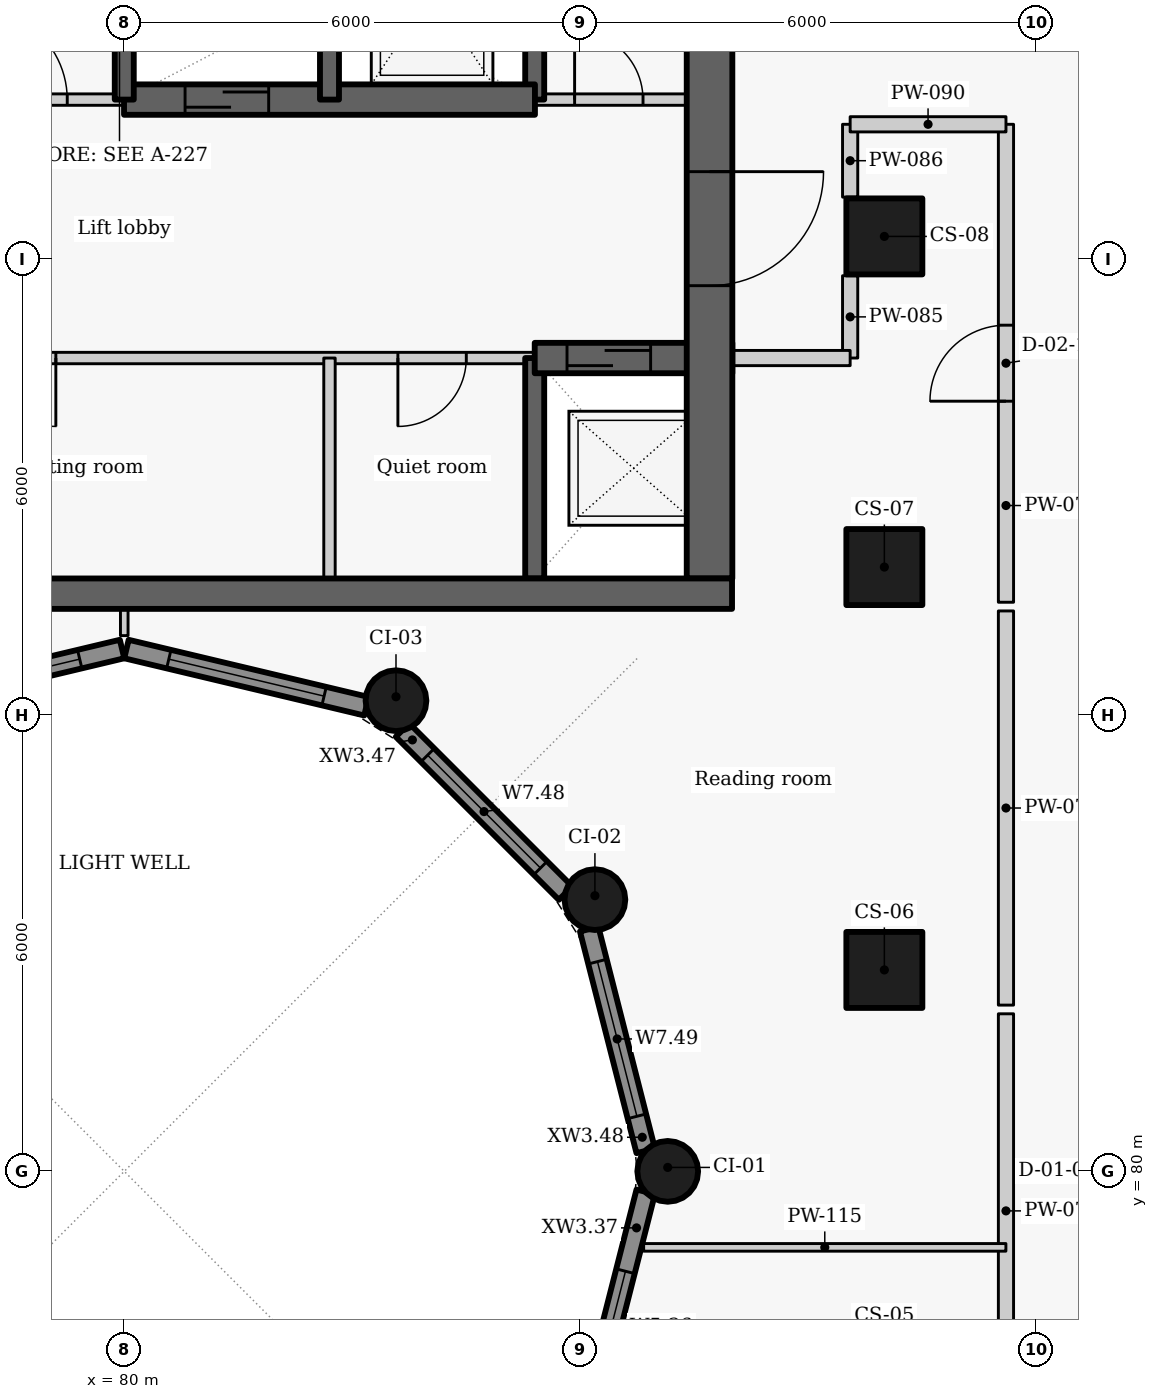
"""IFC4 building model, lengths in metres.
Left out: names, types, materials, properties, quantities, classifications, styles, units other than length and angle.
Written with IfcOpenShell. Run it as: python <this file> out.ifc"""

import sys

from ifc_helpers import new_model, si_unit, direction, frame, frame_2d, origin, origin_2d, place, context, subcontext, project, spatial, rectangle, circle, extrude, element, fill, save


model = new_model("IFC4")
c1 = context("Model", 3, precision=1e-05, world=origin(), true_north=direction((0.0, 1.0)))
c2 = subcontext(c1, "Body", "Model", "MODEL_VIEW")
j1 = project(units=[si_unit("LENGTHUNIT", "METRE"), si_unit("PLANEANGLEUNIT", "RADIAN")], contexts=[c1])
p1 = place(None, origin())
s1 = spatial("IfcSite", under=j1, at=p1, CompositionType="ELEMENT")
p2 = place(p1, origin())
s2 = spatial("IfcBuilding", under=s1, at=p2, CompositionType="ELEMENT")
p3 = place(p2, frame((0.0, 0.0, 150.3)))
s3 = spatial("IfcBuildingStorey", under=s2, at=p3, CompositionType="ELEMENT", Elevation=150.3)
for number, where, z_axis, x_axis in (
    (1, (90.0, 82.65, 0.0), (0.0, 0.0, 1.0), (0.0, 1.0, 0.0)),
    (2, (90.0, 87.95, 0.0), (0.0, 0.0, 1.0), (0.0, 1.0, 0.0)),
    (3, (90.0, 92.3, 0.0), (0.0, 0.0, 1.0), (0.0, 1.0, 0.0)),
):
    element("IfcColumn", number, at=place(p3, frame(where, z_axis=z_axis, x_axis=x_axis)), inside=s3, PredefinedType="COLUMN", context=c2, shape_type="SweptSolid", body=[
        extrude(rectangle(XDim=1.0, YDim=1.0, at=origin_2d()), origin(), (0.0, 0.0, 1.0), 3.3),
    ])
for number, where, z_axis, x_axis in (
    (4, (87.15, 80.0, 0.0), (0.0, 0.0, 1.0), (0.0, 1.0, 0.0)),
    (5, (86.192, 83.575, 0.0), (0.0, 0.0, 1.0), (-0.5, 0.866, 0.0)),
    (6, (83.575, 86.192, 0.0), (0.0, 0.0, 1.0), (-0.866, 0.5, 0.0)),
):
    element("IfcColumn", number, at=place(p3, frame(where, z_axis=z_axis, x_axis=x_axis)), inside=s3, PredefinedType="COLUMN", context=c2, shape_type="SweptSolid", body=[
        extrude(circle(Radius=0.4, at=origin_2d()), origin(), (0.0, 0.0, 1.0), 3.3),
    ])
p4 = place(p3, frame((86.86, 79.73, 0.0), z_axis=(0.0, 0.0, 1.0), x_axis=(-0.247055971283, -0.969001211069, 0.0)))
e7 = element("IfcWall", 7, at=p4, inside=s3, PredefinedType="SOLIDWALL", context=c2, shape_type="SweptSolid", body=[
    extrude(rectangle(XDim=3.01, YDim=0.25, at=frame_2d((1.505, 0.0))), origin(), (0.0, 0.0, 1.0), 2.425),
])
p5 = place(p4, frame((1.077, 0.0, 0.9)))
e8 = element("IfcOpeningElement", 8, at=p5, cuts=e7, PredefinedType="OPENING", context=c2, shape_type="SweptSolid", body=[
    extrude(rectangle(XDim=1.5, YDim=1.1, at=frame_2d((0.75, 0.55))), frame((0.0, 0.135, 0.0), z_axis=(0.0, -1.0, 0.0), x_axis=(1.0, 0.0, 0.0)), (0.0, 0.0, 1.0), 0.27),
])
p6 = place(p3, frame((76.814, 86.119, 0.0), z_axis=(0.0, 0.0, 1.0), x_axis=(0.972773113459, 0.231759508395, 0.0)))
e9 = element("IfcWall", 9, at=p6, inside=s3, PredefinedType="SOLIDWALL", context=c2, shape_type="SweptSolid", body=[
    extrude(rectangle(XDim=3.246, YDim=0.25, at=frame_2d((1.623, 0.0))), origin(), (0.0, 0.0, 1.0), 2.425),
])
p7 = place(p6, frame((0.573, 0.0, 0.9)))
e10 = element("IfcOpeningElement", 10, at=p7, cuts=e9, PredefinedType="OPENING", context=c2, shape_type="SweptSolid", body=[
    extrude(rectangle(XDim=2.1, YDim=1.1, at=frame_2d((1.05, 0.55))), frame((0.0, 0.135, 0.0), z_axis=(0.0, -1.0, 0.0), x_axis=(1.0, 0.0, 0.0)), (0.0, 0.0, 1.0), 0.27),
])
p8 = place(p3, frame((80.029, 86.872, 0.0), z_axis=(0.0, 0.0, 1.0), x_axis=(0.972773113459, -0.231759508395, 0.0)))
e11 = element("IfcWall", 11, at=p8, inside=s3, PredefinedType="SOLIDWALL", context=c2, shape_type="SweptSolid", body=[
    extrude(rectangle(XDim=3.246, YDim=0.25, at=frame_2d((1.623, 0.0))), origin(), (0.0, 0.0, 1.0), 2.425),
])
p9 = place(p8, frame((0.573, 0.0, 0.9)))
e12 = element("IfcOpeningElement", 12, at=p9, cuts=e11, PredefinedType="OPENING", context=c2, shape_type="SweptSolid", body=[
    extrude(rectangle(XDim=2.1, YDim=1.1, at=frame_2d((1.05, 0.55))), frame((0.0, 0.135, 0.0), z_axis=(0.0, -1.0, 0.0), x_axis=(1.0, 0.0, 0.0)), (0.0, 0.0, 1.0), 0.27),
])
p10 = place(p3, frame((83.661, 85.806, 0.0), z_axis=(0.0, 0.0, 1.0), x_axis=(0.707106781187, -0.707106781187, 0.0)))
e13 = element("IfcWall", 13, at=p10, inside=s3, PredefinedType="SOLIDWALL", context=c2, shape_type="SweptSolid", body=[
    extrude(rectangle(XDim=3.033, YDim=0.25, at=frame_2d((1.517, 0.0))), origin(), (0.0, 0.0, 1.0), 2.425),
])
p11 = place(p10, frame((0.467, 0.0, 0.9)))
e14 = element("IfcOpeningElement", 14, at=p11, cuts=e13, PredefinedType="OPENING", context=c2, shape_type="SweptSolid", body=[
    extrude(rectangle(XDim=2.1, YDim=1.1, at=frame_2d((1.05, 0.55))), frame((0.0, 0.135, 0.0), z_axis=(0.0, -1.0, 0.0), x_axis=(1.0, 0.0, 0.0)), (0.0, 0.0, 1.0), 0.27),
])
p12 = place(p3, frame((86.117, 83.187, 0.0), z_axis=(0.0, 0.0, 1.0), x_axis=(0.247055971283, -0.969001211069, 0.0)))
e15 = element("IfcWall", 15, at=p12, inside=s3, PredefinedType="SOLIDWALL", context=c2, shape_type="SweptSolid", body=[
    extrude(rectangle(XDim=3.01, YDim=0.25, at=frame_2d((1.505, 0.0))), origin(), (0.0, 0.0, 1.0), 2.425),
])
p13 = place(p12, frame((0.441, 0.0, 0.9)))
e16 = element("IfcOpeningElement", 16, at=p13, cuts=e15, PredefinedType="OPENING", context=c2, shape_type="SweptSolid", body=[
    extrude(rectangle(XDim=2.1, YDim=1.1, at=frame_2d((1.05, 0.55))), frame((0.0, 0.135, 0.0), z_axis=(0.0, -1.0, 0.0), x_axis=(1.0, 0.0, 0.0)), (0.0, 0.0, 1.0), 0.27),
])
p14 = place(p3, frame((85.4, 90.7, 0.0), z_axis=(0.0, 0.0, 1.0), x_axis=(-1.0, 0.0, 0.0)))
e17 = element("IfcWall", 17, at=p14, inside=s3, PredefinedType="PARTITIONING", context=c2, shape_type="SweptSolid", body=[
    extrude(rectangle(XDim=13.4, YDim=0.15, at=frame_2d((6.7, 0.0))), origin(), (0.0, 0.0, 1.0), 3.025),
])
p15 = place(p14, frame((11.325, 0.0, 0.0)))
e18 = element("IfcOpeningElement", 18, at=p15, cuts=e17, PredefinedType="OPENING", context=c2, shape_type="SweptSolid", body=[
    extrude(rectangle(XDim=0.9, YDim=2.1, at=frame_2d((0.45, 1.05))), frame((0.0, 0.085, 0.0), z_axis=(0.0, -1.0, 0.0), x_axis=(1.0, 0.0, 0.0)), (0.0, 0.0, 1.0), 0.17),
])
p16 = place(p14, frame((6.3, 0.0, 0.0)))
e19 = element("IfcOpeningElement", 19, at=p16, cuts=e17, PredefinedType="OPENING", context=c2, shape_type="SweptSolid", body=[
    extrude(rectangle(XDim=0.9, YDim=2.1, at=frame_2d((0.45, 1.05))), frame((0.0, 0.085, 0.0), z_axis=(0.0, -1.0, 0.0), x_axis=(1.0, 0.0, 0.0)), (0.0, 0.0, 1.0), 0.17),
])
p17 = place(p14, frame((0.9, 0.0, 0.0)))
e20 = element("IfcOpeningElement", 20, at=p17, cuts=e17, PredefinedType="OPENING", context=c2, shape_type="SweptSolid", body=[
    extrude(rectangle(XDim=0.9, YDim=2.1, at=frame_2d((0.45, 1.05))), frame((0.0, 0.085, 0.0), z_axis=(0.0, -1.0, 0.0), x_axis=(1.0, 0.0, 0.0)), (0.0, 0.0, 1.0), 0.17),
])
p18 = place(p3, frame((85.4, 87.8, -0.275), z_axis=(0.0, 0.0, 1.0), x_axis=(0.0, 1.0, 0.0)))
e21 = element("IfcWall", 21, at=p18, inside=s3, PredefinedType="SHEAR", context=c2, shape_type="SweptSolid", body=[
    extrude(rectangle(XDim=2.9, YDim=0.25, at=frame_2d((1.45, 0.0))), origin(), (0.0, 0.0, 1.0), 3.3),
])
p19 = place(p3, frame((85.4, 94.1, -0.275), z_axis=(0.0, 0.0, 1.0), x_axis=(0.0, 1.0, 0.0)))
e22 = element("IfcWall", 22, at=p19, inside=s3, PredefinedType="SHEAR", context=c2, shape_type="SweptSolid", body=[
    extrude(rectangle(XDim=2.8, YDim=0.25, at=frame_2d((1.4, 0.0))), origin(), (0.0, 0.0, 1.0), 3.3),
])
p20 = place(p3, frame((85.4, 90.7, -0.275), z_axis=(0.0, 0.0, 1.0), x_axis=(1.0, 0.0, 0.0)))
e23 = element("IfcWall", 23, at=p20, inside=s3, PredefinedType="SHEAR", context=c2, shape_type="SweptSolid", body=[
    extrude(rectangle(XDim=2.6, YDim=0.4, at=frame_2d((1.3, 0.0))), origin(), (0.0, 0.0, 1.0), 3.3),
])
p21 = place(p20, frame((0.425, 0.0, 0.275)))
e24 = element("IfcOpeningElement", 24, at=p21, cuts=e23, PredefinedType="OPENING", context=c2, shape_type="SweptSolid", body=[
    extrude(rectangle(XDim=1.1, YDim=2.1, at=frame_2d((0.55, 1.05))), frame((0.0, 0.21, 0.0), z_axis=(0.0, -1.0, 0.0), x_axis=(1.0, 0.0, 0.0)), (0.0, 0.0, 1.0), 0.42),
])
p22 = place(p3, frame((87.7, 103.4, -0.275), z_axis=(0.0, 0.0, 1.0), x_axis=(0.0, -1.0, 0.0)))
e25 = element("IfcWall", 25, at=p22, inside=s3, PredefinedType="SHEAR", context=c2, shape_type="SweptSolid", body=[
    extrude(rectangle(XDim=15.6, YDim=0.6, at=frame_2d((7.8, 0.0))), origin(), (0.0, 0.0, 1.0), 3.3),
])
p23 = place(p22, frame((10.248, 0.0, 0.275)))
e26 = element("IfcOpeningElement", 26, at=p23, cuts=e25, PredefinedType="OPENING", context=c2, shape_type="SweptSolid", body=[
    extrude(rectangle(XDim=1.5, YDim=2.1, at=frame_2d((0.75, 1.05))), frame((0.0, 0.31, 0.0), z_axis=(0.0, -1.0, 0.0), x_axis=(1.0, 0.0, 0.0)), (0.0, 0.0, 1.0), 0.62),
])
p24 = place(p3, frame((82.7, 87.8, 0.0), z_axis=(0.0, 0.0, 1.0), x_axis=(0.0, 1.0, 0.0)))
e27 = element("IfcWall", 27, at=p24, inside=s3, PredefinedType="PARTITIONING", context=c2, shape_type="SweptSolid", body=[
    extrude(rectangle(XDim=2.9, YDim=0.15, at=frame_2d((1.45, 0.0))), origin(), (0.0, 0.0, 1.0), 3.025),
])
p25 = place(p3, frame((77.297, 94.1, 0.0), z_axis=(0.0, 0.0, 1.0), x_axis=(1.0, 0.0, 0.0)))
e28 = element("IfcWall", 28, at=p25, inside=s3, PredefinedType="PARTITIONING", context=c2, shape_type="SweptSolid", body=[
    extrude(rectangle(XDim=2.706, YDim=0.15, at=frame_2d((1.353, 0.0))), origin(), (0.0, 0.0, 1.0), 3.025),
])
p26 = place(p25, frame((0.753, 0.0, 0.0)))
e29 = element("IfcOpeningElement", 29, at=p26, cuts=e28, PredefinedType="OPENING", context=c2, shape_type="SweptSolid", body=[
    extrude(rectangle(XDim=1.2, YDim=2.1, at=frame_2d((0.6, 1.05))), frame((0.0, 0.085, 0.0), z_axis=(0.0, -1.0, 0.0), x_axis=(1.0, 0.0, 0.0)), (0.0, 0.0, 1.0), 0.17),
])
p27 = place(p3, frame((85.397, 94.1, 0.0), z_axis=(0.0, 0.0, 1.0), x_axis=(1.0, 0.0, 0.0)))
e30 = element("IfcWall", 30, at=p27, inside=s3, PredefinedType="PARTITIONING", context=c2, shape_type="SweptSolid", body=[
    extrude(rectangle(XDim=2.603, YDim=0.15, at=frame_2d((1.302, 0.0))), origin(), (0.0, 0.0, 1.0), 3.025),
])
p28 = place(p27, frame((0.528, 0.0, 0.0)))
e31 = element("IfcOpeningElement", 31, at=p28, cuts=e30, PredefinedType="OPENING", context=c2, shape_type="SweptSolid", body=[
    extrude(rectangle(XDim=0.9, YDim=2.1, at=frame_2d((0.45, 1.05))), frame((0.0, 0.085, 0.0), z_axis=(0.0, -1.0, 0.0), x_axis=(1.0, 0.0, 0.0)), (0.0, 0.0, 1.0), 0.17),
])
p29 = place(p3, frame((79.997, 94.1, -0.275), z_axis=(0.0, 0.0, 1.0), x_axis=(1.0, 0.0, 0.0)))
e32 = element("IfcWall", 32, at=p29, inside=s3, PredefinedType="SHEAR", context=c2, shape_type="SweptSolid", body=[
    extrude(rectangle(XDim=5.406, YDim=0.4, at=frame_2d((2.703, 0.0))), origin(), (0.0, 0.0, 1.0), 3.3),
])
p30 = place(p29, frame((0.803, 0.0, 0.275)))
e33 = element("IfcOpeningElement", 33, at=p30, cuts=e32, PredefinedType="OPENING", context=c2, shape_type="SweptSolid", body=[
    extrude(rectangle(XDim=1.1, YDim=2.1, at=frame_2d((0.55, 1.05))), frame((0.0, 0.21, 0.0), z_axis=(0.0, -1.0, 0.0), x_axis=(1.0, 0.0, 0.0)), (0.0, 0.0, 1.0), 0.42),
])
for number, where, z_axis, x_axis in (
    (34, (80.0, 94.1, -0.275), (0.0, 0.0, 1.0), (0.0, 1.0, 0.0)),
    (35, (82.7, 94.1, -0.275), (0.0, 0.0, 1.0), (0.0, 1.0, 0.0)),
):
    element("IfcWall", number, at=place(p3, frame(where, z_axis=z_axis, x_axis=x_axis)), inside=s3, PredefinedType="SHEAR", context=c2, shape_type="SweptSolid", body=[
        extrude(rectangle(XDim=2.8, YDim=0.25, at=frame_2d((1.4, 0.0))), origin(), (0.0, 0.0, 1.0), 3.3),
    ])
for number, where, z_axis, x_axis in (
    (36, (91.6, 76.887, 0.0), (0.0, 0.0, 1.0), (0.0, 1.0, 0.0)),
    (37, (91.6, 82.187, 0.0), (0.0, 0.0, 1.0), (0.0, 1.0, 0.0)),
):
    element("IfcWall", number, at=place(p3, frame(where, z_axis=z_axis, x_axis=x_axis)), inside=s3, PredefinedType="PARTITIONING", context=c2, shape_type="SweptSolid", body=[
        extrude(rectangle(XDim=5.186, YDim=0.2, at=frame_2d((2.593, 0.0))), origin(), (0.0, 0.0, 1.0), 3.025),
    ])
p31 = place(p3, frame((91.6, 87.487, 0.0), z_axis=(0.0, 0.0, 1.0), x_axis=(0.0, 1.0, 0.0)))
e38 = element("IfcWall", 38, at=p31, inside=s3, PredefinedType="PARTITIONING", context=c2, shape_type="SweptSolid", body=[
    extrude(rectangle(XDim=6.288, YDim=0.2, at=frame_2d((3.144, 0.0))), origin(), (0.0, 0.0, 1.0), 3.025),
])
p32 = place(p31, frame((2.645, 0.0, 0.0)))
e39 = element("IfcOpeningElement", 39, at=p32, cuts=e38, PredefinedType="OPENING", context=c2, shape_type="SweptSolid", body=[
    extrude(rectangle(XDim=1.0, YDim=2.1, at=frame_2d((0.5, 1.05))), frame((0.0, 0.11, 0.0), z_axis=(0.0, -1.0, 0.0), x_axis=(1.0, 0.0, 0.0)), (0.0, 0.0, 1.0), 0.22),
])
p33 = place(p3, frame((89.55, 90.7, 0.0), z_axis=(0.0, 0.0, 1.0), x_axis=(0.0, 1.0, 0.0)))
e40 = element("IfcWall", 40, at=p33, inside=s3, PredefinedType="PARTITIONING", context=c2, shape_type="SweptSolid", body=[
    extrude(rectangle(XDim=1.083, YDim=0.2, at=frame_2d((0.542, 0.0))), origin(), (0.0, 0.0, 1.0), 3.025),
])
p34 = place(p3, frame((89.55, 92.817, 0.0), z_axis=(0.0, 0.0, 1.0), x_axis=(0.0, 1.0, 0.0)))
e41 = element("IfcWall", 41, at=p34, inside=s3, PredefinedType="PARTITIONING", context=c2, shape_type="SweptSolid", body=[
    extrude(rectangle(XDim=0.958, YDim=0.2, at=frame_2d((0.479, 0.0))), origin(), (0.0, 0.0, 1.0), 3.025),
])
p35 = place(p3, frame((89.55, 93.775, 0.0), z_axis=(0.0, 0.0, 1.0), x_axis=(1.0, 0.0, 0.0)))
e42 = element("IfcWall", 42, at=p35, inside=s3, PredefinedType="PARTITIONING", context=c2, shape_type="SweptSolid", body=[
    extrude(rectangle(XDim=2.05, YDim=0.2, at=frame_2d((1.025, 0.0))), origin(), (0.0, 0.0, 1.0), 2.505),
])
p36 = place(p3, frame((88.0, 90.7, 0.0), z_axis=(0.0, 0.0, 1.0), x_axis=(1.0, 0.0, 0.0)))
e43 = element("IfcWall", 43, at=p36, inside=s3, PredefinedType="PARTITIONING", context=c2, shape_type="SweptSolid", body=[
    extrude(rectangle(XDim=1.55, YDim=0.2, at=frame_2d((0.775, 0.0))), origin(), (0.0, 0.0, 1.0), 3.025),
])
p37 = place(p3, frame((80.0, 87.048, 0.0), z_axis=(0.0, 0.0, 1.0), x_axis=(0.0, 1.0, 0.0)))
e44 = element("IfcWall", 44, at=p37, inside=s3, PredefinedType="PARTITIONING", context=c2, shape_type="SweptSolid", body=[
    extrude(rectangle(XDim=0.352, YDim=0.1, at=frame_2d((0.176, 0.0))), origin(), (0.0, 0.0, 1.0), 3.025),
])
p38 = place(p3, frame((86.833, 79.0, 0.0), z_axis=(0.0, 0.0, 1.0), x_axis=(1.0, 0.0, 0.0)))
e45 = element("IfcWall", 45, at=p38, inside=s3, PredefinedType="PARTITIONING", context=c2, shape_type="SweptSolid", body=[
    extrude(rectangle(XDim=4.766, YDim=0.1, at=frame_2d((2.383, 0.0))), origin(), (0.0, 0.0, 1.0), 2.505),
])
p39 = place(p3, frame((72.004, 87.6, -0.275), z_axis=(0.0, 0.0, 1.0), x_axis=(1.0, 0.0, 0.0)))
e46 = element("IfcWall", 46, at=p39, inside=s3, PredefinedType="SHEAR", context=c2, shape_type="SweptSolid", body=[
    extrude(rectangle(XDim=15.992, YDim=0.4, at=frame_2d((7.996, 0.0))), origin(), (0.0, 0.0, 1.0), 3.3),
])
p40 = place(p5, origin())
e47 = element("IfcWindow", 47, at=p40, inside=s3, PartitioningType="SINGLE_PANEL", PredefinedType="WINDOW", context=c2, shape_type="SweptSolid", body=[
    extrude(rectangle(XDim=1.5, YDim=1.1, at=frame_2d((0.75, 0.55))), frame((0.0, 0.03, 0.0), z_axis=(0.0, -1.0, 0.0), x_axis=(1.0, 0.0, 0.0)), (0.0, 0.0, 1.0), 0.06),
])
fill(e8, e47)
p41 = place(p7, origin())
e48 = element("IfcWindow", 48, at=p41, inside=s3, PartitioningType="SINGLE_PANEL", PredefinedType="WINDOW", context=c2, shape_type="SweptSolid", body=[
    extrude(rectangle(XDim=2.1, YDim=1.1, at=frame_2d((1.05, 0.55))), frame((0.0, 0.03, 0.0), z_axis=(0.0, -1.0, 0.0), x_axis=(1.0, 0.0, 0.0)), (0.0, 0.0, 1.0), 0.06),
])
fill(e10, e48)
p42 = place(p9, origin())
e49 = element("IfcWindow", 49, at=p42, inside=s3, PartitioningType="SINGLE_PANEL", PredefinedType="WINDOW", context=c2, shape_type="SweptSolid", body=[
    extrude(rectangle(XDim=2.1, YDim=1.1, at=frame_2d((1.05, 0.55))), frame((0.0, 0.03, 0.0), z_axis=(0.0, -1.0, 0.0), x_axis=(1.0, 0.0, 0.0)), (0.0, 0.0, 1.0), 0.06),
])
fill(e12, e49)
p43 = place(p11, origin())
e50 = element("IfcWindow", 50, at=p43, inside=s3, PartitioningType="SINGLE_PANEL", PredefinedType="WINDOW", context=c2, shape_type="SweptSolid", body=[
    extrude(rectangle(XDim=2.1, YDim=1.1, at=frame_2d((1.05, 0.55))), frame((0.0, 0.03, 0.0), z_axis=(0.0, -1.0, 0.0), x_axis=(1.0, 0.0, 0.0)), (0.0, 0.0, 1.0), 0.06),
])
fill(e14, e50)
p44 = place(p13, origin())
e51 = element("IfcWindow", 51, at=p44, inside=s3, PartitioningType="SINGLE_PANEL", PredefinedType="WINDOW", context=c2, shape_type="SweptSolid", body=[
    extrude(rectangle(XDim=2.1, YDim=1.1, at=frame_2d((1.05, 0.55))), frame((0.0, 0.03, 0.0), z_axis=(0.0, -1.0, 0.0), x_axis=(1.0, 0.0, 0.0)), (0.0, 0.0, 1.0), 0.06),
])
fill(e16, e51)
p45 = place(p21, origin())
e52 = element("IfcDoor", 52, at=p45, inside=s3, OperationType="SLIDING_TO_LEFT", PredefinedType="DOOR", context=c2, shape_type="SweptSolid", body=[
    extrude(rectangle(XDim=1.1, YDim=2.1, at=frame_2d((0.55, 1.05))), frame((0.0, 0.025, 0.0), z_axis=(0.0, -1.0, 0.0), x_axis=(1.0, 0.0, 0.0)), (0.0, 0.0, 1.0), 0.05),
])
fill(e24, e52)
p46 = place(p16, origin())
e53 = element("IfcDoor", 53, at=p46, inside=s3, OperationType="SINGLE_SWING_LEFT", PredefinedType="DOOR", context=c2, shape_type="SweptSolid", body=[
    extrude(rectangle(XDim=0.9, YDim=2.1, at=frame_2d((0.45, 1.05))), frame((0.0, 0.025, 0.0), z_axis=(0.0, -1.0, 0.0), x_axis=(1.0, 0.0, 0.0)), (0.0, 0.0, 1.0), 0.05),
])
fill(e19, e53)
p47 = place(p17, origin())
e54 = element("IfcDoor", 54, at=p47, inside=s3, OperationType="SINGLE_SWING_RIGHT", PredefinedType="DOOR", context=c2, shape_type="SweptSolid", body=[
    extrude(rectangle(XDim=0.9, YDim=2.1, at=frame_2d((0.45, 1.05))), frame((0.0, 0.025, 0.0), z_axis=(0.0, -1.0, 0.0), x_axis=(1.0, 0.0, 0.0)), (0.0, 0.0, 1.0), 0.05),
])
fill(e20, e54)
p48 = place(p26, origin())
e55 = element("IfcDoor", 55, at=p48, inside=s3, OperationType="DOUBLE_DOOR_SINGLE_SWING", PredefinedType="DOOR", context=c2, shape_type="SweptSolid", body=[
    extrude(rectangle(XDim=1.2, YDim=2.1, at=frame_2d((0.6, 1.05))), frame((0.0, 0.025, 0.0), z_axis=(0.0, -1.0, 0.0), x_axis=(1.0, 0.0, 0.0)), (0.0, 0.0, 1.0), 0.05),
])
fill(e29, e55)
p49 = place(p30, origin())
e56 = element("IfcDoor", 56, at=p49, inside=s3, OperationType="SLIDING_TO_LEFT", PredefinedType="DOOR", context=c2, shape_type="SweptSolid", body=[
    extrude(rectangle(XDim=1.1, YDim=2.1, at=frame_2d((0.55, 1.05))), frame((0.0, 0.025, 0.0), z_axis=(0.0, -1.0, 0.0), x_axis=(1.0, 0.0, 0.0)), (0.0, 0.0, 1.0), 0.05),
])
fill(e33, e56)
p50 = place(p28, origin())
e57 = element("IfcDoor", 57, at=p50, inside=s3, OperationType="SINGLE_SWING_LEFT", PredefinedType="DOOR", context=c2, shape_type="SweptSolid", body=[
    extrude(rectangle(XDim=0.9, YDim=2.1, at=frame_2d((0.45, 1.05))), frame((0.0, 0.025, 0.0), z_axis=(0.0, -1.0, 0.0), x_axis=(1.0, 0.0, 0.0)), (0.0, 0.0, 1.0), 0.05),
])
fill(e31, e57)
p51 = place(p32, origin())
e58 = element("IfcDoor", 58, at=p51, inside=s3, OperationType="SINGLE_SWING_LEFT", PredefinedType="DOOR", context=c2, shape_type="SweptSolid", body=[
    extrude(rectangle(XDim=1.0, YDim=2.1, at=frame_2d((0.5, 1.05))), frame((0.0, 0.025, 0.0), z_axis=(0.0, -1.0, 0.0), x_axis=(1.0, 0.0, 0.0)), (0.0, 0.0, 1.0), 0.05),
])
fill(e39, e58)
p52 = place(p23, origin())
e59 = element("IfcDoor", 59, at=p52, inside=s3, OperationType="DOUBLE_DOOR_SINGLE_SWING", PredefinedType="DOOR", context=c2, shape_type="SweptSolid", body=[
    extrude(rectangle(XDim=1.5, YDim=2.1, at=frame_2d((0.75, 1.05))), frame((0.0, 0.025, 0.0), z_axis=(0.0, -1.0, 0.0), x_axis=(1.0, 0.0, 0.0)), (0.0, 0.0, 1.0), 0.05),
])
fill(e26, e59)
save(model, sys.argv[1])
